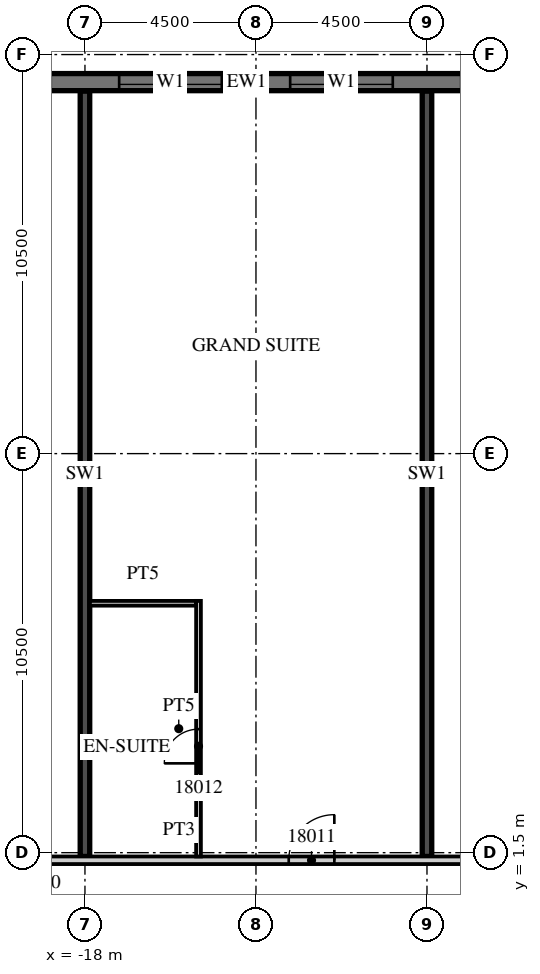
"""IFC4 building model, lengths in metres.
Left out: names, types, materials, properties, quantities, classifications, styles, units other than length and angle.
Written with IfcOpenShell. Run it as: python <this file> out.ifc"""

import sys

from ifc_helpers import new_model, si_unit, direction, frame, frame_2d, origin, place, context, subcontext, project, spatial, rectangle, extrude, element, fill, save


model = new_model("IFC4")
c1 = context("Model", 3, precision=1e-05, world=origin(), true_north=direction((0.0, 1.0)))
c2 = subcontext(c1, "Body", "Model", "MODEL_VIEW")
j1 = project(units=[si_unit("LENGTHUNIT", "METRE"), si_unit("PLANEANGLEUNIT", "RADIAN")], contexts=[c1])
p1 = place(None, origin())
s1 = spatial("IfcSite", under=j1, at=p1, CompositionType="ELEMENT")
p2 = place(p1, origin())
s2 = spatial("IfcBuilding", under=s1, at=p2, CompositionType="ELEMENT")
p3 = place(p2, frame((0.0, 0.0, 89.7)))
s3 = spatial("IfcBuildingStorey", under=s2, at=p3, CompositionType="ELEMENT", Elevation=89.7)
for number, where, z_axis, x_axis in (
    (1, (-18.0, 1.4, 0.0), (0.0, 0.0, 1.0), (0.0, 1.0, 0.0)),
    (2, (-9.0, 1.4, 0.0), (0.0, 0.0, 1.0), (0.0, 1.0, 0.0)),
):
    element("IfcWall", number, at=place(p3, frame(where, z_axis=z_axis, x_axis=x_axis)), inside=s3, PredefinedType="SHEAR", context=c2, shape_type="SweptSolid", body=[
        extrude(rectangle(XDim=20.14, YDim=0.25, at=frame_2d((10.07, 0.0))), origin(), (0.0, 0.0, 1.0), 3.3),
    ])
p4 = place(p3, frame((13.5, 21.775, 0.0), z_axis=(0.0, 0.0, 1.0), x_axis=(-1.0, 0.0, 0.0)))
e3 = element("IfcWall", 3, at=p4, inside=s3, PredefinedType="SOLIDWALL", context=c2, shape_type="SweptSolid", body=[
    extrude(rectangle(XDim=54.5, YDim=0.45, at=frame_2d((27.25, 0.0))), origin(), (0.0, 0.0, 1.0), 3.02),
])
p5 = place(p4, frame((0.9, 0.0, 0.45)))
e4 = element("IfcOpeningElement", 4, at=p5, cuts=e3, PredefinedType="OPENING", context=c2, shape_type="SweptSolid", body=[
    extrude(rectangle(XDim=2.7, YDim=2.25, at=frame_2d((1.35, 1.125))), frame((0.0, 0.235, 0.0), z_axis=(0.0, -1.0, 0.0), x_axis=(1.0, 0.0, 0.0)), (0.0, 0.0, 1.0), 0.47),
])
p6 = place(p4, frame((5.4, 0.0, 0.45)))
e5 = element("IfcOpeningElement", 5, at=p6, cuts=e3, PredefinedType="OPENING", context=c2, shape_type="SweptSolid", body=[
    extrude(rectangle(XDim=2.7, YDim=2.25, at=frame_2d((1.35, 1.125))), frame((0.0, 0.235, 0.0), z_axis=(0.0, -1.0, 0.0), x_axis=(1.0, 0.0, 0.0)), (0.0, 0.0, 1.0), 0.47),
])
p7 = place(p4, frame((9.9, 0.0, 0.45)))
e6 = element("IfcOpeningElement", 6, at=p7, cuts=e3, PredefinedType="OPENING", context=c2, shape_type="SweptSolid", body=[
    extrude(rectangle(XDim=2.7, YDim=2.25, at=frame_2d((1.35, 1.125))), frame((0.0, 0.235, 0.0), z_axis=(0.0, -1.0, 0.0), x_axis=(1.0, 0.0, 0.0)), (0.0, 0.0, 1.0), 0.47),
])
p8 = place(p4, frame((14.4, 0.0, 0.45)))
e7 = element("IfcOpeningElement", 7, at=p8, cuts=e3, PredefinedType="OPENING", context=c2, shape_type="SweptSolid", body=[
    extrude(rectangle(XDim=2.7, YDim=2.25, at=frame_2d((1.35, 1.125))), frame((0.0, 0.235, 0.0), z_axis=(0.0, -1.0, 0.0), x_axis=(1.0, 0.0, 0.0)), (0.0, 0.0, 1.0), 0.47),
])
p9 = place(p4, frame((18.9, 0.0, 0.45)))
e8 = element("IfcOpeningElement", 8, at=p9, cuts=e3, PredefinedType="OPENING", context=c2, shape_type="SweptSolid", body=[
    extrude(rectangle(XDim=2.7, YDim=2.25, at=frame_2d((1.35, 1.125))), frame((0.0, 0.235, 0.0), z_axis=(0.0, -1.0, 0.0), x_axis=(1.0, 0.0, 0.0)), (0.0, 0.0, 1.0), 0.47),
])
p10 = place(p4, frame((23.4, 0.0, 0.45)))
e9 = element("IfcOpeningElement", 9, at=p10, cuts=e3, PredefinedType="OPENING", context=c2, shape_type="SweptSolid", body=[
    extrude(rectangle(XDim=2.7, YDim=2.25, at=frame_2d((1.35, 1.125))), frame((0.0, 0.235, 0.0), z_axis=(0.0, -1.0, 0.0), x_axis=(1.0, 0.0, 0.0)), (0.0, 0.0, 1.0), 0.47),
])
p11 = place(p4, frame((27.9, 0.0, 0.45)))
e10 = element("IfcOpeningElement", 10, at=p11, cuts=e3, PredefinedType="OPENING", context=c2, shape_type="SweptSolid", body=[
    extrude(rectangle(XDim=2.7, YDim=2.25, at=frame_2d((1.35, 1.125))), frame((0.0, 0.235, 0.0), z_axis=(0.0, -1.0, 0.0), x_axis=(1.0, 0.0, 0.0)), (0.0, 0.0, 1.0), 0.47),
])
p12 = place(p4, frame((32.4, 0.0, 0.45)))
e11 = element("IfcOpeningElement", 11, at=p12, cuts=e3, PredefinedType="OPENING", context=c2, shape_type="SweptSolid", body=[
    extrude(rectangle(XDim=2.7, YDim=2.25, at=frame_2d((1.35, 1.125))), frame((0.0, 0.235, 0.0), z_axis=(0.0, -1.0, 0.0), x_axis=(1.0, 0.0, 0.0)), (0.0, 0.0, 1.0), 0.47),
])
p13 = place(p4, frame((36.9, 0.0, 0.45)))
e12 = element("IfcOpeningElement", 12, at=p13, cuts=e3, PredefinedType="OPENING", context=c2, shape_type="SweptSolid", body=[
    extrude(rectangle(XDim=2.7, YDim=2.25, at=frame_2d((1.35, 1.125))), frame((0.0, 0.235, 0.0), z_axis=(0.0, -1.0, 0.0), x_axis=(1.0, 0.0, 0.0)), (0.0, 0.0, 1.0), 0.47),
])
p14 = place(p4, frame((41.4, 0.0, 0.45)))
e13 = element("IfcOpeningElement", 13, at=p14, cuts=e3, PredefinedType="OPENING", context=c2, shape_type="SweptSolid", body=[
    extrude(rectangle(XDim=2.7, YDim=2.25, at=frame_2d((1.35, 1.125))), frame((0.0, 0.235, 0.0), z_axis=(0.0, -1.0, 0.0), x_axis=(1.0, 0.0, 0.0)), (0.0, 0.0, 1.0), 0.47),
])
p15 = place(p4, frame((45.9, 0.0, 0.45)))
e14 = element("IfcOpeningElement", 14, at=p15, cuts=e3, PredefinedType="OPENING", context=c2, shape_type="SweptSolid", body=[
    extrude(rectangle(XDim=2.7, YDim=2.25, at=frame_2d((1.35, 1.125))), frame((0.0, 0.235, 0.0), z_axis=(0.0, -1.0, 0.0), x_axis=(1.0, 0.0, 0.0)), (0.0, 0.0, 1.0), 0.47),
])
p16 = place(p4, frame((50.4, 0.0, 0.45)))
e15 = element("IfcOpeningElement", 15, at=p16, cuts=e3, PredefinedType="OPENING", context=c2, shape_type="SweptSolid", body=[
    extrude(rectangle(XDim=2.7, YDim=2.25, at=frame_2d((1.35, 1.125))), frame((0.0, 0.235, 0.0), z_axis=(0.0, -1.0, 0.0), x_axis=(1.0, 0.0, 0.0)), (0.0, 0.0, 1.0), 0.47),
])
p17 = place(p3, frame((-44.55, 1.3, 0.0), z_axis=(0.0, 0.0, 1.0), x_axis=(1.0, 0.0, 0.0)))
e16 = element("IfcWall", 16, at=p17, inside=s3, PredefinedType="PARTITIONING", context=c2, shape_type="SweptSolid", body=[
    extrude(rectangle(XDim=58.05, YDim=0.2, at=frame_2d((29.025, 0.0))), origin(), (0.0, 0.0, 1.0), 3.02),
])
p18 = place(p17, frame((0.525, 0.0, 0.0)))
e17 = element("IfcOpeningElement", 17, at=p18, cuts=e16, PredefinedType="OPENING", context=c2, shape_type="SweptSolid", body=[
    extrude(rectangle(XDim=1.0, YDim=2.1, at=frame_2d((0.5, 1.05))), frame((0.0, 0.11, 0.0), z_axis=(0.0, -1.0, 0.0), x_axis=(1.0, 0.0, 0.0)), (0.0, 0.0, 1.0), 0.22),
])
p19 = place(p17, frame((6.975, 0.0, 0.0)))
e18 = element("IfcOpeningElement", 18, at=p19, cuts=e16, PredefinedType="OPENING", context=c2, shape_type="SweptSolid", body=[
    extrude(rectangle(XDim=1.0, YDim=2.1, at=frame_2d((0.5, 1.05))), frame((0.0, 0.11, 0.0), z_axis=(0.0, -1.0, 0.0), x_axis=(1.0, 0.0, 0.0)), (0.0, 0.0, 1.0), 0.22),
])
p20 = place(p17, frame((11.5, 0.0, 0.0)))
e19 = element("IfcOpeningElement", 19, at=p20, cuts=e16, PredefinedType="OPENING", context=c2, shape_type="SweptSolid", body=[
    extrude(rectangle(XDim=1.0, YDim=2.1, at=frame_2d((0.5, 1.05))), frame((0.0, 0.11, 0.0), z_axis=(0.0, -1.0, 0.0), x_axis=(1.0, 0.0, 0.0)), (0.0, 0.0, 1.0), 0.22),
])
p21 = place(p17, frame((13.6, 0.0, 0.0)))
e20 = element("IfcOpeningElement", 20, at=p21, cuts=e16, PredefinedType="OPENING", context=c2, shape_type="SweptSolid", body=[
    extrude(rectangle(XDim=1.0, YDim=2.1, at=frame_2d((0.5, 1.05))), frame((0.0, 0.11, 0.0), z_axis=(0.0, -1.0, 0.0), x_axis=(1.0, 0.0, 0.0)), (0.0, 0.0, 1.0), 0.22),
])
p22 = place(p17, frame((22.912, 0.0, 0.0)))
e21 = element("IfcOpeningElement", 21, at=p22, cuts=e16, PredefinedType="OPENING", context=c2, shape_type="SweptSolid", body=[
    extrude(rectangle(XDim=1.2, YDim=2.1, at=frame_2d((0.6, 1.05))), frame((0.0, 0.11, 0.0), z_axis=(0.0, -1.0, 0.0), x_axis=(1.0, 0.0, 0.0)), (0.0, 0.0, 1.0), 0.22),
])
p23 = place(p17, frame((31.912, 0.0, 0.0)))
e22 = element("IfcOpeningElement", 22, at=p23, cuts=e16, PredefinedType="OPENING", context=c2, shape_type="SweptSolid", body=[
    extrude(rectangle(XDim=1.2, YDim=2.1, at=frame_2d((0.6, 1.05))), frame((0.0, 0.11, 0.0), z_axis=(0.0, -1.0, 0.0), x_axis=(1.0, 0.0, 0.0)), (0.0, 0.0, 1.0), 0.22),
])
p24 = place(p17, frame((37.987, 0.0, 0.0)))
e23 = element("IfcOpeningElement", 23, at=p24, cuts=e16, PredefinedType="OPENING", context=c2, shape_type="SweptSolid", body=[
    extrude(rectangle(XDim=1.2, YDim=2.1, at=frame_2d((0.6, 1.05))), frame((0.0, 0.11, 0.0), z_axis=(0.0, -1.0, 0.0), x_axis=(1.0, 0.0, 0.0)), (0.0, 0.0, 1.0), 0.22),
])
p25 = place(p17, frame((46.987, 0.0, 0.0)))
e24 = element("IfcOpeningElement", 24, at=p25, cuts=e16, PredefinedType="OPENING", context=c2, shape_type="SweptSolid", body=[
    extrude(rectangle(XDim=1.2, YDim=2.1, at=frame_2d((0.6, 1.05))), frame((0.0, 0.11, 0.0), z_axis=(0.0, -1.0, 0.0), x_axis=(1.0, 0.0, 0.0)), (0.0, 0.0, 1.0), 0.22),
])
p26 = place(p17, frame((54.125, 0.0, 0.0)))
e25 = element("IfcOpeningElement", 25, at=p26, cuts=e16, PredefinedType="OPENING", context=c2, shape_type="SweptSolid", body=[
    extrude(rectangle(XDim=1.0, YDim=2.1, at=frame_2d((0.5, 1.05))), frame((0.0, 0.11, 0.0), z_axis=(0.0, -1.0, 0.0), x_axis=(1.0, 0.0, 0.0)), (0.0, 0.0, 1.0), 0.22),
])
p27 = place(p3, frame((-15.012, 1.4, 0.0), z_axis=(0.0, 0.0, 1.0), x_axis=(0.0, 1.0, 0.0)))
e26 = element("IfcWall", 26, at=p27, inside=s3, PredefinedType="PARTITIONING", context=c2, shape_type="SweptSolid", body=[
    extrude(rectangle(XDim=6.725, YDim=0.125, at=frame_2d((3.363, 0.0))), origin(), (0.0, 0.0, 1.0), 3.02),
])
p28 = place(p27, frame((2.45, 0.0, 0.0)))
e27 = element("IfcOpeningElement", 27, at=p28, cuts=e26, PredefinedType="OPENING", context=c2, shape_type="SweptSolid", body=[
    extrude(rectangle(XDim=0.9, YDim=2.1, at=frame_2d((0.45, 1.05))), frame((0.0, 0.073, 0.0), z_axis=(0.0, -1.0, 0.0), x_axis=(1.0, 0.0, 0.0)), (0.0, 0.0, 1.0), 0.145),
])
p29 = place(p3, frame((-17.875, 8.062, 0.0), z_axis=(0.0, 0.0, 1.0), x_axis=(1.0, 0.0, 0.0)))
e28 = element("IfcWall", 28, at=p29, inside=s3, PredefinedType="PARTITIONING", context=c2, shape_type="SweptSolid", body=[
    extrude(rectangle(XDim=2.8, YDim=0.125, at=frame_2d((1.4, 0.0))), origin(), (0.0, 0.0, 1.0), 3.02),
])
p30 = place(p10, origin())
e29 = element("IfcWindow", 29, at=p30, inside=s3, PartitioningType="SINGLE_PANEL", PredefinedType="WINDOW", context=c2, shape_type="SweptSolid", body=[
    extrude(rectangle(XDim=2.7, YDim=2.25, at=frame_2d((1.35, 1.125))), frame((0.0, 0.09, 0.0), z_axis=(0.0, -1.0, 0.0), x_axis=(1.0, 0.0, 0.0)), (0.0, 0.0, 1.0), 0.06),
])
fill(e9, e29)
p31 = place(p11, origin())
e30 = element("IfcWindow", 30, at=p31, inside=s3, PartitioningType="SINGLE_PANEL", PredefinedType="WINDOW", context=c2, shape_type="SweptSolid", body=[
    extrude(rectangle(XDim=2.7, YDim=2.25, at=frame_2d((1.35, 1.125))), frame((0.0, 0.09, 0.0), z_axis=(0.0, -1.0, 0.0), x_axis=(1.0, 0.0, 0.0)), (0.0, 0.0, 1.0), 0.06),
])
fill(e10, e30)
p32 = place(p23, origin())
e31 = element("IfcDoor", 31, at=p32, inside=s3, OperationType="SINGLE_SWING_RIGHT", PredefinedType="DOOR", context=c2, shape_type="SweptSolid", body=[
    extrude(rectangle(XDim=1.2, YDim=2.1, at=frame_2d((0.6, 1.05))), frame((0.0, 0.025, 0.0), z_axis=(0.0, -1.0, 0.0), x_axis=(1.0, 0.0, 0.0)), (0.0, 0.0, 1.0), 0.05),
])
fill(e22, e31)
p33 = place(p28, origin())
e32 = element("IfcDoor", 32, at=p33, inside=s3, OperationType="SINGLE_SWING_LEFT", PredefinedType="DOOR", context=c2, shape_type="SweptSolid", body=[
    extrude(rectangle(XDim=0.9, YDim=2.1, at=frame_2d((0.45, 1.05))), frame((0.0, 0.025, 0.0), z_axis=(0.0, -1.0, 0.0), x_axis=(1.0, 0.0, 0.0)), (0.0, 0.0, 1.0), 0.05),
])
fill(e27, e32)
save(model, sys.argv[1])
